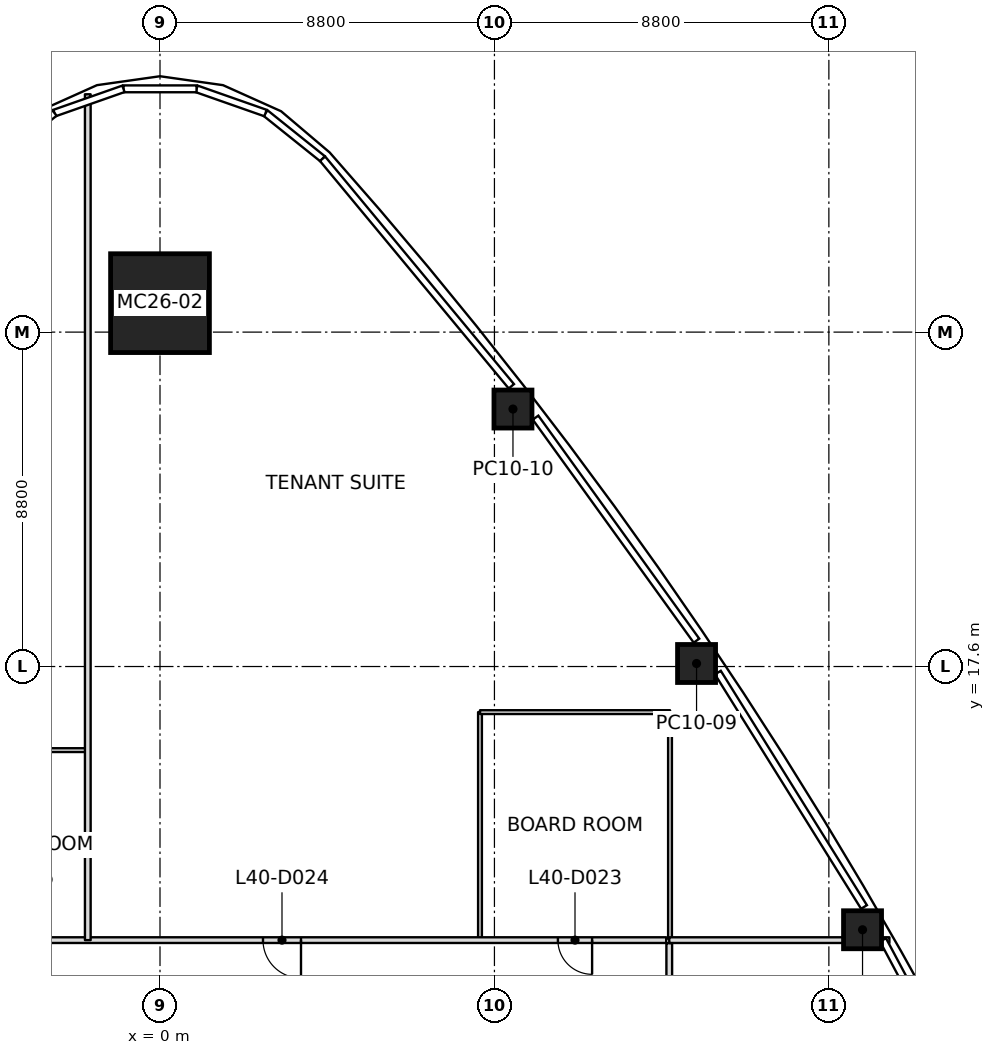
"""IFC4 building model, lengths in metres.
Left out: names, types, materials, properties, quantities, classifications, styles, units other than length and angle.
Written with IfcOpenShell. Run it as: python <this file> out.ifc"""

import sys

from ifc_helpers import new_model, si_unit, direction, frame, frame_2d, origin, origin_2d, place, context, subcontext, project, spatial, rectangle, extrude, element, fill, save


model = new_model("IFC4")
c1 = context("Model", 3, precision=1e-05, world=origin(), true_north=direction((0.0, 1.0)))
c2 = subcontext(c1, "Body", "Model", "MODEL_VIEW")
j1 = project(units=[si_unit("LENGTHUNIT", "METRE"), si_unit("PLANEANGLEUNIT", "RADIAN")], contexts=[c1])
p1 = place(None, origin())
s1 = spatial("IfcSite", under=j1, at=p1, CompositionType="ELEMENT")
p2 = place(p1, origin())
s2 = spatial("IfcBuilding", under=s1, at=p2, CompositionType="ELEMENT")
p3 = place(p2, frame((0.0, 0.0, 181.8)))
s3 = spatial("IfcBuildingStorey", under=s2, at=p3, CompositionType="ELEMENT", Elevation=181.8)
p4 = place(p3, frame((0.0, 27.162, 0.0), z_axis=(0.0, -0.032331720729, 0.999477193254), x_axis=(1.0, 0.0, 0.0)))
e1 = element("IfcColumn", 1, at=p4, inside=s3, PredefinedType="COLUMN", context=c2, shape_type="SweptSolid", body=[
    extrude(rectangle(XDim=2.6, YDim=2.6, at=origin_2d()), origin(), (0.0, 0.0, 1.0), 4.002),
])
p5 = place(p3, frame((18.486, 10.673, 0.0), z_axis=(-0.009887049298, -0.00573692984, 0.999934664812), x_axis=(-0.499975560967, 0.866039512843, 2.5126546e-05)))
e2 = element("IfcColumn", 2, at=p5, inside=s3, PredefinedType="COLUMN", context=c2, shape_type="SweptSolid", body=[
    extrude(rectangle(XDim=1.0, YDim=1.0, at=origin_2d()), origin(), (0.0, 0.0, 1.0), 4.0),
])
p6 = place(p3, frame((14.118, 17.68, 0.0), z_axis=(-0.005248490815, -0.013243284963, 0.999898529226), x_axis=(-0.55734623632, 0.83024095087, 0.00807070984)))
e3 = element("IfcColumn", 3, at=p6, inside=s3, PredefinedType="COLUMN", context=c2, shape_type="SweptSolid", body=[
    extrude(rectangle(XDim=1.0, YDim=1.0, at=origin_2d()), origin(), (0.0, 0.0, 1.0), 4.0),
])
p7 = place(p3, frame((9.288, 24.375, 0.0), z_axis=(-0.000244089295, -0.02050350076, 0.999789751336), x_axis=(-0.612160679672, 0.790570217655, 0.016063412501)))
e4 = element("IfcColumn", 4, at=p7, inside=s3, PredefinedType="COLUMN", context=c2, shape_type="SweptSolid", body=[
    extrude(rectangle(XDim=1.0, YDim=1.0, at=origin_2d()), origin(), (0.0, 0.0, 1.0), 4.001),
])
p8 = place(p3, frame((-1.9, 10.4, 0.0), z_axis=(0.0, 0.0, 1.0), x_axis=(0.0, 1.0, 0.0)))
e5 = element("IfcWall", 5, at=p8, inside=s3, PredefinedType="PARTITIONING", context=c2, shape_type="SweptSolid", body=[
    extrude(rectangle(XDim=22.259, YDim=0.15, at=frame_2d((11.129, 0.0))), origin(), (0.0, 0.0, 1.0), 3.234),
])
p9 = place(p3, frame((13.4, 10.4, 0.0), z_axis=(0.0, 0.0, 1.0), x_axis=(1.0, 0.0, 0.0)))
e6 = element("IfcWall", 6, at=p9, inside=s3, PredefinedType="PARTITIONING", context=c2, shape_type="SweptSolid", body=[
    extrude(rectangle(XDim=5.793, YDim=0.15, at=frame_2d((2.896, 0.0))), origin(), (0.0, 0.0, 1.0), 3.45),
])
p10 = place(p3, frame((13.32, 10.4, 0.0), z_axis=(0.0, 0.0, 1.0), x_axis=(-1.0, 0.0, 0.0)))
e7 = element("IfcWall", 7, at=p10, inside=s3, PredefinedType="PARTITIONING", context=c2, shape_type="SweptSolid", body=[
    extrude(rectangle(XDim=26.64, YDim=0.15, at=frame_2d((13.32, 0.0))), origin(), (0.0, 0.0, 1.0), 3.166),
])
p11 = place(p10, frame((1.95, 0.0, 0.0)))
e8 = element("IfcOpeningElement", 8, at=p11, cuts=e7, PredefinedType="OPENING", context=c2, shape_type="SweptSolid", body=[
    extrude(rectangle(XDim=0.9, YDim=2.1, at=frame_2d((0.45, 1.05))), frame((0.0, 0.075, 0.0), z_axis=(0.0, -1.0, 0.0), x_axis=(1.0, 0.0, 0.0)), (0.0, 0.0, 1.0), 0.15),
])
p12 = place(p10, frame((9.61, 0.0, 0.0)))
e9 = element("IfcOpeningElement", 9, at=p12, cuts=e7, PredefinedType="OPENING", context=c2, shape_type="SweptSolid", body=[
    extrude(rectangle(XDim=1.0, YDim=2.1, at=frame_2d((0.5, 1.05))), frame((0.0, 0.075, 0.0), z_axis=(0.0, -1.0, 0.0), x_axis=(1.0, 0.0, 0.0)), (0.0, 0.0, 1.0), 0.15),
])
p13 = place(p10, frame((16.87, 0.0, 0.0)))
e10 = element("IfcOpeningElement", 10, at=p13, cuts=e7, PredefinedType="OPENING", context=c2, shape_type="SweptSolid", body=[
    extrude(rectangle(XDim=0.9, YDim=2.1, at=frame_2d((0.45, 1.05))), frame((0.0, 0.075, 0.0), z_axis=(0.0, -1.0, 0.0), x_axis=(1.0, 0.0, 0.0)), (0.0, 0.0, 1.0), 0.15),
])
p14 = place(p10, frame((22.63, 0.0, 0.0)))
e11 = element("IfcOpeningElement", 11, at=p14, cuts=e7, PredefinedType="OPENING", context=c2, shape_type="SweptSolid", body=[
    extrude(rectangle(XDim=1.0, YDim=2.1, at=frame_2d((0.5, 1.05))), frame((0.0, 0.075, 0.0), z_axis=(0.0, -1.0, 0.0), x_axis=(1.0, 0.0, 0.0)), (0.0, 0.0, 1.0), 0.15),
])
p15 = place(p3, frame((13.4, -10.32, 0.0), z_axis=(0.0, 0.0, 1.0), x_axis=(0.0, 1.0, 0.0)))
e12 = element("IfcWall", 12, at=p15, inside=s3, PredefinedType="PARTITIONING", context=c2, shape_type="SweptSolid", body=[
    extrude(rectangle(XDim=20.64, YDim=0.15, at=frame_2d((10.32, 0.0))), origin(), (0.0, 0.0, 1.0), 3.166),
])
p16 = place(p15, frame((10.57, 0.0, 0.0)))
e13 = element("IfcOpeningElement", 13, at=p16, cuts=e12, PredefinedType="OPENING", context=c2, shape_type="SweptSolid", body=[
    extrude(rectangle(XDim=0.9, YDim=2.1, at=frame_2d((0.45, 1.05))), frame((0.0, 0.075, 0.0), z_axis=(0.0, -1.0, 0.0), x_axis=(1.0, 0.0, 0.0)), (0.0, 0.0, 1.0), 0.15),
])
p17 = place(p15, frame((16.32, 0.0, 0.0)))
e14 = element("IfcOpeningElement", 14, at=p17, cuts=e12, PredefinedType="OPENING", context=c2, shape_type="SweptSolid", body=[
    extrude(rectangle(XDim=1.0, YDim=2.1, at=frame_2d((0.5, 1.05))), frame((0.0, 0.075, 0.0), z_axis=(0.0, -1.0, 0.0), x_axis=(1.0, 0.0, 0.0)), (0.0, 0.0, 1.0), 0.15),
])
p18 = place(p15, frame((1.55, 0.0, 0.0)))
e15 = element("IfcOpeningElement", 15, at=p18, cuts=e12, PredefinedType="OPENING", context=c2, shape_type="SweptSolid", body=[
    extrude(rectangle(XDim=0.9, YDim=2.1, at=frame_2d((0.45, 1.05))), frame((0.0, 0.075, 0.0), z_axis=(0.0, -1.0, 0.0), x_axis=(1.0, 0.0, 0.0)), (0.0, 0.0, 1.0), 0.15),
])
p19 = place(p15, frame((6.21, 0.0, 0.0)))
e16 = element("IfcOpeningElement", 16, at=p19, cuts=e12, PredefinedType="OPENING", context=c2, shape_type="SweptSolid", body=[
    extrude(rectangle(XDim=1.0, YDim=2.1, at=frame_2d((0.5, 1.05))), frame((0.0, 0.075, 0.0), z_axis=(0.0, -1.0, 0.0), x_axis=(1.0, 0.0, 0.0)), (0.0, 0.0, 1.0), 0.15),
])
p20 = place(p3, frame((-6.1, 15.4, 0.0), z_axis=(0.0, 0.0, 1.0), x_axis=(1.0, 0.0, 0.0)))
e17 = element("IfcWall", 17, at=p20, inside=s3, PredefinedType="PARTITIONING", context=c2, shape_type="SweptSolid", body=[
    extrude(rectangle(XDim=4.17, YDim=0.1, at=frame_2d((2.085, 0.0))), origin(), (0.0, 0.0, 1.0), 3.45),
])
p21 = place(p3, frame((8.42, 10.43, 0.0), z_axis=(0.0, 0.0, 1.0), x_axis=(0.0, 1.0, 0.0)))
e18 = element("IfcWall", 18, at=p21, inside=s3, PredefinedType="PARTITIONING", context=c2, shape_type="SweptSolid", body=[
    extrude(rectangle(XDim=5.97, YDim=0.1, at=frame_2d((2.985, 0.0))), origin(), (0.0, 0.0, 1.0), 3.247),
])
p22 = place(p3, frame((8.42, 16.4, 0.0), z_axis=(0.0, 0.0, 1.0), x_axis=(1.0, 0.0, 0.0)))
e19 = element("IfcWall", 19, at=p22, inside=s3, PredefinedType="PARTITIONING", context=c2, shape_type="SweptSolid", body=[
    extrude(rectangle(XDim=5.0, YDim=0.1, at=frame_2d((2.5, 0.0))), origin(), (0.0, 0.0, 1.0), 3.247),
])
p23 = place(p3, frame((13.42, 16.4, 0.0), z_axis=(0.0, 0.0, 1.0), x_axis=(0.0, -1.0, 0.0)))
e20 = element("IfcWall", 20, at=p23, inside=s3, PredefinedType="PARTITIONING", context=c2, shape_type="SweptSolid", body=[
    extrude(rectangle(XDim=5.97, YDim=0.1, at=frame_2d((2.985, 0.0))), origin(), (0.0, 0.0, 1.0), 3.247),
])
p24 = place(p11, origin())
e21 = element("IfcDoor", 21, at=p24, inside=s3, OperationType="SINGLE_SWING_RIGHT", PredefinedType="DOOR", context=c2, shape_type="SweptSolid", body=[
    extrude(rectangle(XDim=0.9, YDim=2.1, at=frame_2d((0.45, 1.05))), frame((0.0, 0.025, 0.0), z_axis=(0.0, -1.0, 0.0), x_axis=(1.0, 0.0, 0.0)), (0.0, 0.0, 1.0), 0.05),
])
fill(e8, e21)
p25 = place(p12, origin())
e22 = element("IfcDoor", 22, at=p25, inside=s3, OperationType="SINGLE_SWING_RIGHT", PredefinedType="DOOR", context=c2, shape_type="SweptSolid", body=[
    extrude(rectangle(XDim=1.0, YDim=2.1, at=frame_2d((0.5, 1.05))), frame((0.0, 0.025, 0.0), z_axis=(0.0, -1.0, 0.0), x_axis=(1.0, 0.0, 0.0)), (0.0, 0.0, 1.0), 0.05),
])
fill(e9, e22)
save(model, sys.argv[1])
